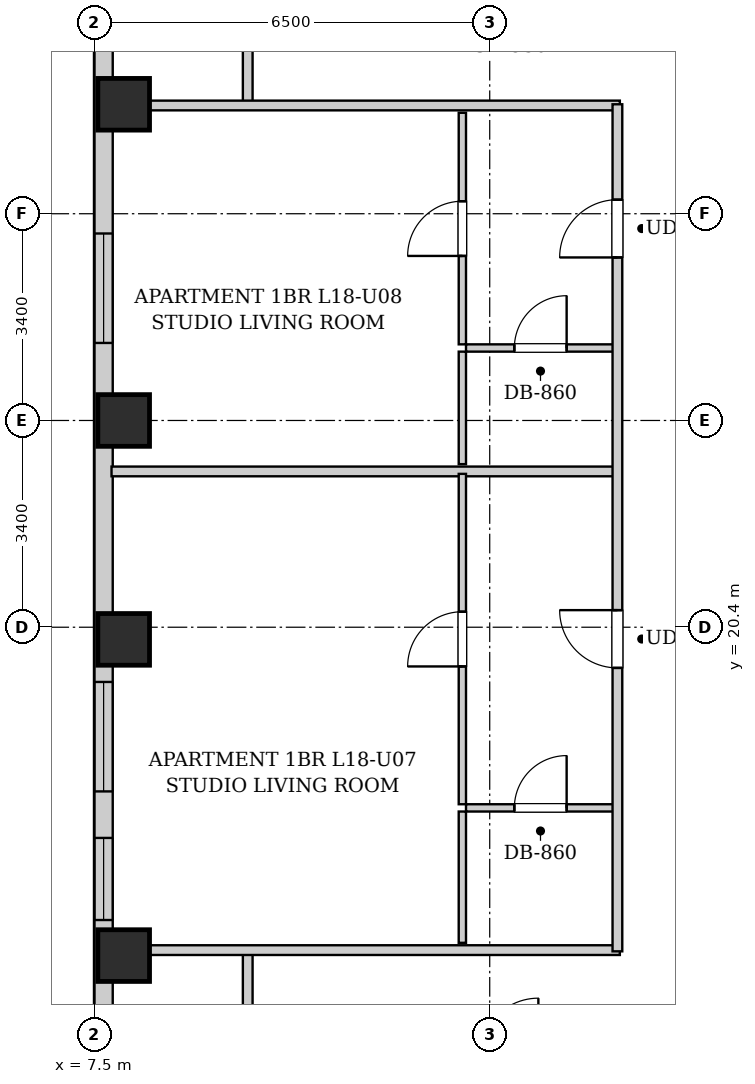
"""IFC4 building model, lengths in metres.
Left out: names, types, materials, properties, quantities, classifications, styles, units other than length and angle.
Written with IfcOpenShell. Run it as: python <this file> out.ifc"""

import sys

from ifc_helpers import new_model, si_unit, direction, frame, frame_2d, origin, origin_2d, place, context, subcontext, project, spatial, rectangle, extrude, element, fill, save


model = new_model("IFC4")
c1 = context("Model", 3, precision=1e-05, world=origin(), true_north=direction((0.0, 1.0)))
c2 = subcontext(c1, "Body", "Model", "MODEL_VIEW")
j1 = project(units=[si_unit("LENGTHUNIT", "METRE"), si_unit("PLANEANGLEUNIT", "RADIAN")], contexts=[c1])
p1 = place(None, origin())
s1 = spatial("IfcSite", under=j1, at=p1, CompositionType="ELEMENT")
p2 = place(p1, origin())
s2 = spatial("IfcBuilding", under=s1, at=p2, CompositionType="ELEMENT")
p3 = place(p2, frame((0.0, 0.0, 67.4)))
s3 = spatial("IfcBuildingStorey", under=s2, at=p3, CompositionType="ELEMENT", Elevation=67.4)
for number, where, z_axis, x_axis in (
    (1, (7.98, 15.0, 0.0), (0.0, 0.0, 1.0), (1.0, 0.0, 0.0)),
    (2, (7.98, 20.2, 0.0), (0.0, 0.0, 1.0), (1.0, 0.0, 0.0)),
    (3, (7.98, 23.8, 0.0), (0.0, 0.0, 1.0), (1.0, 0.0, 0.0)),
    (4, (7.98, 29.0, 0.0), (0.0, 0.0, 1.0), (1.0, 0.0, 0.0)),
):
    element("IfcColumn", number, at=place(p3, frame(where, z_axis=z_axis, x_axis=x_axis)), inside=s3, PredefinedType="COLUMN", context=c2, shape_type="SweptSolid", body=[
        extrude(rectangle(XDim=0.85, YDim=0.85, at=origin_2d()), origin(), (0.0, 0.0, 1.0), 3.2),
    ])
p4 = place(p3, frame((7.65, 2.5, 0.0), z_axis=(0.0, 0.0, 1.0), x_axis=(0.0, 1.0, 0.0)))
e5 = element("IfcWall", 5, at=p4, inside=s3, PredefinedType="SOLIDWALL", context=c2, shape_type="SweptSolid", body=[
    extrude(rectangle(XDim=42.6, YDim=0.3, at=frame_2d((21.3, 0.0))), origin(), (0.0, 0.0, 1.0), 1.915),
])
p5 = place(p4, frame((3.15, 0.0, 0.55)))
e6 = element("IfcOpeningElement", 6, at=p5, cuts=e5, PredefinedType="OPENING", context=c2, shape_type="SweptSolid", body=[
    extrude(rectangle(XDim=1.8, YDim=1.2, at=frame_2d((0.9, 0.6))), frame((0.0, 0.16, 0.0), z_axis=(0.0, -1.0, 0.0), x_axis=(1.0, 0.0, 0.0)), (0.0, 0.0, 1.0), 0.32),
])
p6 = place(p4, frame((1.185, 0.0, 0.55)))
e7 = element("IfcOpeningElement", 7, at=p6, cuts=e5, PredefinedType="OPENING", context=c2, shape_type="SweptSolid", body=[
    extrude(rectangle(XDim=1.35, YDim=1.2, at=frame_2d((0.675, 0.6))), frame((0.0, 0.16, 0.0), z_axis=(0.0, -1.0, 0.0), x_axis=(1.0, 0.0, 0.0)), (0.0, 0.0, 1.0), 0.32),
])
p7 = place(p4, frame((37.085, 0.0, 0.55)))
e8 = element("IfcOpeningElement", 8, at=p7, cuts=e5, PredefinedType="OPENING", context=c2, shape_type="SweptSolid", body=[
    extrude(rectangle(XDim=1.8, YDim=1.2, at=frame_2d((0.9, 0.6))), frame((0.0, 0.16, 0.0), z_axis=(0.0, -1.0, 0.0), x_axis=(1.0, 0.0, 0.0)), (0.0, 0.0, 1.0), 0.32),
])
p8 = place(p4, frame((31.55, 0.0, 0.55)))
e9 = element("IfcOpeningElement", 9, at=p8, cuts=e5, PredefinedType="OPENING", context=c2, shape_type="SweptSolid", body=[
    extrude(rectangle(XDim=1.35, YDim=1.2, at=frame_2d((0.675, 0.6))), frame((0.0, 0.16, 0.0), z_axis=(0.0, -1.0, 0.0), x_axis=(1.0, 0.0, 0.0)), (0.0, 0.0, 1.0), 0.32),
])
p9 = place(p4, frame((15.2, 0.0, 0.55)))
e10 = element("IfcOpeningElement", 10, at=p9, cuts=e5, PredefinedType="OPENING", context=c2, shape_type="SweptSolid", body=[
    extrude(rectangle(XDim=1.8, YDim=1.2, at=frame_2d((0.9, 0.6))), frame((0.0, 0.16, 0.0), z_axis=(0.0, -1.0, 0.0), x_axis=(1.0, 0.0, 0.0)), (0.0, 0.0, 1.0), 0.32),
])
p10 = place(p4, frame((13.085, 0.0, 0.55)))
e11 = element("IfcOpeningElement", 11, at=p10, cuts=e5, PredefinedType="OPENING", context=c2, shape_type="SweptSolid", body=[
    extrude(rectangle(XDim=1.35, YDim=1.2, at=frame_2d((0.675, 0.6))), frame((0.0, 0.16, 0.0), z_axis=(0.0, -1.0, 0.0), x_axis=(1.0, 0.0, 0.0)), (0.0, 0.0, 1.0), 0.32),
])
p11 = place(p4, frame((22.575, 0.0, 0.55)))
e12 = element("IfcOpeningElement", 12, at=p11, cuts=e5, PredefinedType="OPENING", context=c2, shape_type="SweptSolid", body=[
    extrude(rectangle(XDim=1.8, YDim=1.2, at=frame_2d((0.9, 0.6))), frame((0.0, 0.16, 0.0), z_axis=(0.0, -1.0, 0.0), x_axis=(1.0, 0.0, 0.0)), (0.0, 0.0, 1.0), 0.32),
])
for number, where, z_axis, x_axis in (
    (13, (10.02, 13.35, 0.0), (0.0, 0.0, 1.0), (0.0, 1.0, 0.0)),
    (14, (10.02, 28.98, 0.0), (0.0, 0.0, 1.0), (0.0, 1.0, 0.0)),
):
    element("IfcWall", number, at=place(p3, frame(where, z_axis=z_axis, x_axis=x_axis)), inside=s3, PredefinedType="PARTITIONING", context=c2, shape_type="SweptSolid", body=[
        extrude(rectangle(XDim=1.74, YDim=0.16, at=frame_2d((0.87, 0.0))), origin(), (0.0, 0.0, 1.0), 2.88),
    ])
for number, where, z_axis, x_axis in (
    (15, (7.78, 15.09, 0.0), (0.0, 0.0, 1.0), (1.0, 0.0, 0.0)),
    (16, (7.78, 28.98, 0.0), (0.0, 0.0, 1.0), (1.0, 0.0, 0.0)),
):
    element("IfcWall", number, at=place(p3, frame(where, z_axis=z_axis, x_axis=x_axis)), inside=s3, PredefinedType="PARTITIONING", context=c2, shape_type="SweptSolid", body=[
        extrude(rectangle(XDim=8.36, YDim=0.16, at=frame_2d((4.18, 0.0))), origin(), (0.0, 0.0, 1.0), 2.172),
    ])
p12 = place(p3, frame((7.78, 22.962, 0.0), z_axis=(0.0, 0.0, 1.0), x_axis=(1.0, 0.0, 0.0)))
e17 = element("IfcWall", 17, at=p12, inside=s3, PredefinedType="PARTITIONING", context=c2, shape_type="SweptSolid", body=[
    extrude(rectangle(XDim=8.28, YDim=0.16, at=frame_2d((4.14, 0.0))), origin(), (0.0, 0.0, 1.0), 2.88),
])
p13 = place(p3, frame((13.61, 17.429, 0.0), z_axis=(0.0, 0.0, 1.0), x_axis=(1.0, 0.0, 0.0)))
e18 = element("IfcWall", 18, at=p13, inside=s3, PredefinedType="PARTITIONING", context=c2, shape_type="SweptSolid", body=[
    extrude(rectangle(XDim=2.45, YDim=0.12, at=frame_2d((1.225, 0.0))), origin(), (0.0, 0.0, 1.0), 2.88),
])
p14 = place(p13, frame((0.795, 0.0, 0.0)))
e19 = element("IfcOpeningElement", 19, at=p14, cuts=e18, PredefinedType="OPENING", context=c2, shape_type="SweptSolid", body=[
    extrude(rectangle(XDim=0.86, YDim=2.05, at=frame_2d((0.43, 1.025))), frame((0.0, 0.07, 0.0), z_axis=(0.0, -1.0, 0.0), x_axis=(1.0, 0.0, 0.0)), (0.0, 0.0, 1.0), 0.14),
])
p15 = place(p3, frame((13.55, 15.21, 0.0), z_axis=(0.0, 0.0, 1.0), x_axis=(0.0, 1.0, 0.0)))
e20 = element("IfcWall", 20, at=p15, inside=s3, PredefinedType="PARTITIONING", context=c2, shape_type="SweptSolid", body=[
    extrude(rectangle(XDim=2.159, YDim=0.12, at=frame_2d((1.08, 0.0))), origin(), (0.0, 0.0, 1.0), 2.88),
])
p16 = place(p3, frame((13.55, 17.489, 0.0), z_axis=(0.0, 0.0, 1.0), x_axis=(0.0, 1.0, 0.0)))
e21 = element("IfcWall", 21, at=p16, inside=s3, PredefinedType="PARTITIONING", context=c2, shape_type="SweptSolid", body=[
    extrude(rectangle(XDim=5.433, YDim=0.12, at=frame_2d((2.717, 0.0))), origin(), (0.0, 0.0, 1.0), 2.88),
])
p17 = place(p16, frame((2.266, 0.0, 0.0)))
e22 = element("IfcOpeningElement", 22, at=p17, cuts=e21, PredefinedType="OPENING", context=c2, shape_type="SweptSolid", body=[
    extrude(rectangle(XDim=0.9, YDim=2.05, at=frame_2d((0.45, 1.025))), frame((0.0, 0.07, 0.0), z_axis=(0.0, -1.0, 0.0), x_axis=(1.0, 0.0, 0.0)), (0.0, 0.0, 1.0), 0.14),
])
p18 = place(p3, frame((13.61, 24.992, 0.0), z_axis=(0.0, 0.0, 1.0), x_axis=(1.0, 0.0, 0.0)))
e23 = element("IfcWall", 23, at=p18, inside=s3, PredefinedType="PARTITIONING", context=c2, shape_type="SweptSolid", body=[
    extrude(rectangle(XDim=2.45, YDim=0.12, at=frame_2d((1.225, 0.0))), origin(), (0.0, 0.0, 1.0), 2.88),
])
p19 = place(p18, frame((0.795, 0.0, 0.0)))
e24 = element("IfcOpeningElement", 24, at=p19, cuts=e23, PredefinedType="OPENING", context=c2, shape_type="SweptSolid", body=[
    extrude(rectangle(XDim=0.86, YDim=2.05, at=frame_2d((0.43, 1.025))), frame((0.0, 0.07, 0.0), z_axis=(0.0, -1.0, 0.0), x_axis=(1.0, 0.0, 0.0)), (0.0, 0.0, 1.0), 0.14),
])
p20 = place(p3, frame((13.55, 23.082, 0.0), z_axis=(0.0, 0.0, 1.0), x_axis=(0.0, 1.0, 0.0)))
e25 = element("IfcWall", 25, at=p20, inside=s3, PredefinedType="PARTITIONING", context=c2, shape_type="SweptSolid", body=[
    extrude(rectangle(XDim=1.85, YDim=0.12, at=frame_2d((0.925, 0.0))), origin(), (0.0, 0.0, 1.0), 2.88),
])
p21 = place(p3, frame((13.55, 25.052, 0.0), z_axis=(0.0, 0.0, 1.0), x_axis=(0.0, 1.0, 0.0)))
e26 = element("IfcWall", 26, at=p21, inside=s3, PredefinedType="PARTITIONING", context=c2, shape_type="SweptSolid", body=[
    extrude(rectangle(XDim=3.808, YDim=0.12, at=frame_2d((1.904, 0.0))), origin(), (0.0, 0.0, 1.0), 2.88),
])
p22 = place(p21, frame((1.454, 0.0, 0.0)))
e27 = element("IfcOpeningElement", 27, at=p22, cuts=e26, PredefinedType="OPENING", context=c2, shape_type="SweptSolid", body=[
    extrude(rectangle(XDim=0.9, YDim=2.05, at=frame_2d((0.45, 1.025))), frame((0.0, 0.07, 0.0), z_axis=(0.0, -1.0, 0.0), x_axis=(1.0, 0.0, 0.0)), (0.0, 0.0, 1.0), 0.14),
])
p23 = place(p3, frame((16.1, 15.07, 0.0), z_axis=(0.0, 0.0, 1.0), x_axis=(0.0, 1.0, 0.0)))
e28 = element("IfcWall", 28, at=p23, inside=s3, PredefinedType="PARTITIONING", context=c2, shape_type="SweptSolid", body=[
    extrude(rectangle(XDim=13.93, YDim=0.16, at=frame_2d((6.965, 0.0))), origin(), (0.0, 0.0, 1.0), 2.88),
])
p24 = place(p23, frame((4.661, 0.0, 0.0)))
e29 = element("IfcOpeningElement", 29, at=p24, cuts=e28, PredefinedType="OPENING", context=c2, shape_type="SweptSolid", body=[
    extrude(rectangle(XDim=0.95, YDim=2.1, at=frame_2d((0.475, 1.05))), frame((0.0, 0.09, 0.0), z_axis=(0.0, -1.0, 0.0), x_axis=(1.0, 0.0, 0.0)), (0.0, 0.0, 1.0), 0.18),
])
p25 = place(p23, frame((11.411, 0.0, 0.0)))
e30 = element("IfcOpeningElement", 30, at=p25, cuts=e28, PredefinedType="OPENING", context=c2, shape_type="SweptSolid", body=[
    extrude(rectangle(XDim=0.95, YDim=2.1, at=frame_2d((0.475, 1.05))), frame((0.0, 0.09, 0.0), z_axis=(0.0, -1.0, 0.0), x_axis=(1.0, 0.0, 0.0)), (0.0, 0.0, 1.0), 0.18),
])
p26 = place(p14, origin())
e31 = element("IfcDoor", 31, at=p26, inside=s3, OperationType="SINGLE_SWING_RIGHT", PredefinedType="DOOR", context=c2, shape_type="SweptSolid", body=[
    extrude(rectangle(XDim=0.86, YDim=2.05, at=frame_2d((0.43, 1.025))), frame((0.0, 0.025, 0.0), z_axis=(0.0, -1.0, 0.0), x_axis=(1.0, 0.0, 0.0)), (0.0, 0.0, 1.0), 0.05),
])
fill(e19, e31)
p27 = place(p17, origin())
e32 = element("IfcDoor", 32, at=p27, inside=s3, OperationType="SINGLE_SWING_LEFT", PredefinedType="DOOR", context=c2, shape_type="SweptSolid", body=[
    extrude(rectangle(XDim=0.9, YDim=2.05, at=frame_2d((0.45, 1.025))), frame((0.0, 0.025, 0.0), z_axis=(0.0, -1.0, 0.0), x_axis=(1.0, 0.0, 0.0)), (0.0, 0.0, 1.0), 0.05),
])
fill(e22, e32)
p28 = place(p19, origin())
e33 = element("IfcDoor", 33, at=p28, inside=s3, OperationType="SINGLE_SWING_RIGHT", PredefinedType="DOOR", context=c2, shape_type="SweptSolid", body=[
    extrude(rectangle(XDim=0.86, YDim=2.05, at=frame_2d((0.43, 1.025))), frame((0.0, 0.025, 0.0), z_axis=(0.0, -1.0, 0.0), x_axis=(1.0, 0.0, 0.0)), (0.0, 0.0, 1.0), 0.05),
])
fill(e24, e33)
p29 = place(p22, origin())
e34 = element("IfcDoor", 34, at=p29, inside=s3, OperationType="SINGLE_SWING_LEFT", PredefinedType="DOOR", context=c2, shape_type="SweptSolid", body=[
    extrude(rectangle(XDim=0.9, YDim=2.05, at=frame_2d((0.45, 1.025))), frame((0.0, 0.025, 0.0), z_axis=(0.0, -1.0, 0.0), x_axis=(1.0, 0.0, 0.0)), (0.0, 0.0, 1.0), 0.05),
])
fill(e27, e34)
p30 = place(p24, origin())
e35 = element("IfcDoor", 35, at=p30, inside=s3, OperationType="SINGLE_SWING_RIGHT", PredefinedType="DOOR", context=c2, shape_type="SweptSolid", body=[
    extrude(rectangle(XDim=0.95, YDim=2.1, at=frame_2d((0.475, 1.05))), frame((0.0, 0.025, 0.0), z_axis=(0.0, -1.0, 0.0), x_axis=(1.0, 0.0, 0.0)), (0.0, 0.0, 1.0), 0.05),
])
fill(e29, e35)
p31 = place(p25, origin())
e36 = element("IfcDoor", 36, at=p31, inside=s3, OperationType="SINGLE_SWING_LEFT", PredefinedType="DOOR", context=c2, shape_type="SweptSolid", body=[
    extrude(rectangle(XDim=0.95, YDim=2.1, at=frame_2d((0.475, 1.05))), frame((0.0, 0.025, 0.0), z_axis=(0.0, -1.0, 0.0), x_axis=(1.0, 0.0, 0.0)), (0.0, 0.0, 1.0), 0.05),
])
fill(e30, e36)
p32 = place(p9, origin())
e37 = element("IfcWindow", 37, at=p32, inside=s3, PartitioningType="DOUBLE_PANEL_VERTICAL", PredefinedType="WINDOW", context=c2, shape_type="SweptSolid", body=[
    extrude(rectangle(XDim=1.8, YDim=1.2, at=frame_2d((0.9, 0.6))), frame((0.0, 0.03, 0.0), z_axis=(0.0, -1.0, 0.0), x_axis=(1.0, 0.0, 0.0)), (0.0, 0.0, 1.0), 0.06),
])
fill(e10, e37)
p33 = place(p10, origin())
e38 = element("IfcWindow", 38, at=p33, inside=s3, PartitioningType="SINGLE_PANEL", PredefinedType="WINDOW", context=c2, shape_type="SweptSolid", body=[
    extrude(rectangle(XDim=1.35, YDim=1.2, at=frame_2d((0.675, 0.6))), frame((0.0, 0.03, 0.0), z_axis=(0.0, -1.0, 0.0), x_axis=(1.0, 0.0, 0.0)), (0.0, 0.0, 1.0), 0.06),
])
fill(e11, e38)
p34 = place(p11, origin())
e39 = element("IfcWindow", 39, at=p34, inside=s3, PartitioningType="DOUBLE_PANEL_VERTICAL", PredefinedType="WINDOW", context=c2, shape_type="SweptSolid", body=[
    extrude(rectangle(XDim=1.8, YDim=1.2, at=frame_2d((0.9, 0.6))), frame((0.0, 0.03, 0.0), z_axis=(0.0, -1.0, 0.0), x_axis=(1.0, 0.0, 0.0)), (0.0, 0.0, 1.0), 0.06),
])
fill(e12, e39)
save(model, sys.argv[1])
